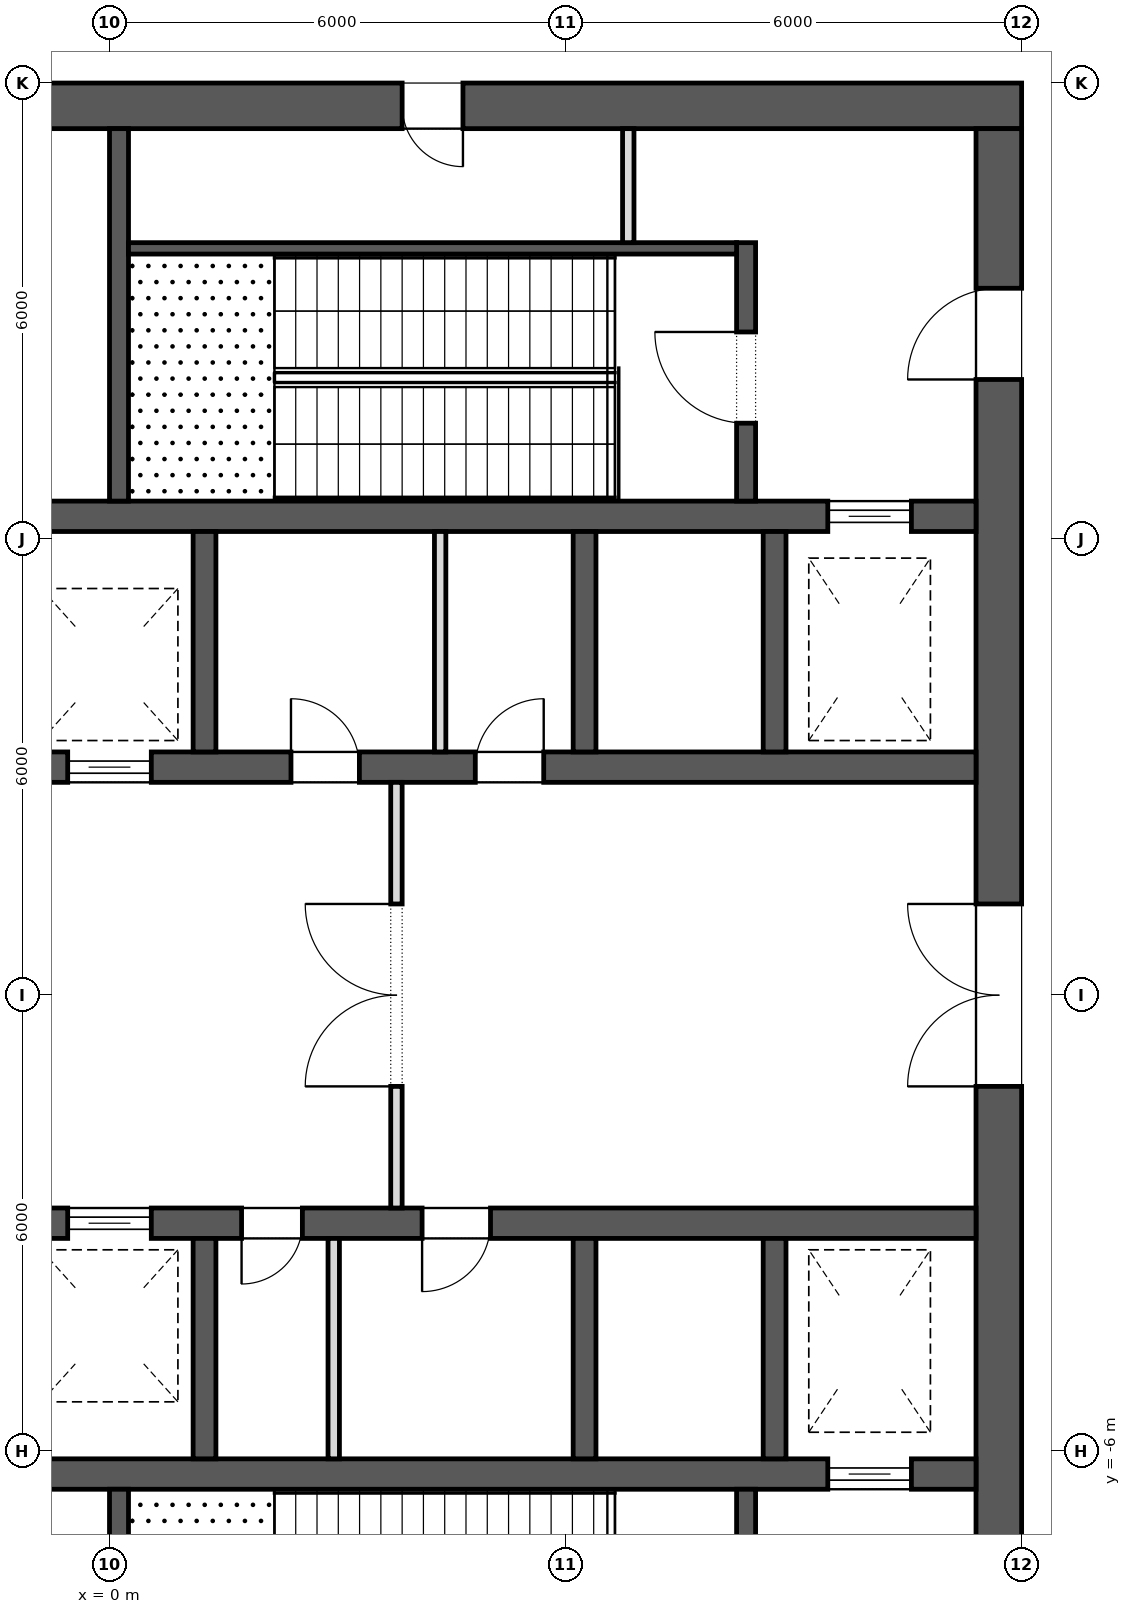
"""IFC4 building model, lengths in metres.
Left out: names, types, materials, properties, quantities, classifications, styles, units other than length and angle.
Written with IfcOpenShell. Run it as: python <this file> out.ifc"""

import sys

from ifc_helpers import new_model, si_unit, direction, frame, frame_2d, origin, place, context, subcontext, project, spatial, rectangle, extrude, element, fill, save


model = new_model("IFC4")
c1 = context("Model", 3, precision=1e-05, world=origin(), true_north=direction((0.0, 1.0)))
c2 = subcontext(c1, "Body", "Model", "MODEL_VIEW")
j1 = project(units=[si_unit("LENGTHUNIT", "METRE"), si_unit("PLANEANGLEUNIT", "RADIAN")], contexts=[c1])
p1 = place(None, origin())
s1 = spatial("IfcSite", under=j1, at=p1, CompositionType="ELEMENT")
p2 = place(p1, origin())
s2 = spatial("IfcBuilding", under=s1, at=p2, CompositionType="ELEMENT")
p3 = place(p2, frame((0.0, 0.0, 343.3)))
s3 = spatial("IfcBuildingStorey", under=s2, at=p3, CompositionType="ELEMENT", Elevation=343.3)
p4 = place(p3, frame((-12.0, 11.7, 0.0), z_axis=(0.0, 0.0, 1.0), x_axis=(1.0, 0.0, 0.0)))
e1 = element("IfcWall", 1, at=p4, inside=s3, PredefinedType="SHEAR", context=c2, shape_type="SweptSolid", body=[
    extrude(rectangle(XDim=24.0, YDim=0.6, at=frame_2d((12.0, 0.0))), origin(), (0.0, 0.0, 1.0), 6.0),
])
p5 = place(p4, frame((9.975, 0.0, 0.0)))
e2 = element("IfcOpeningElement", 2, at=p5, cuts=e1, PredefinedType="OPENING", context=c2, shape_type="SweptSolid", body=[
    extrude(rectangle(XDim=0.9, YDim=2.1, at=frame_2d((0.45, 1.05))), frame((0.0, 0.312, 0.0), z_axis=(0.0, -1.0, 0.0), x_axis=(1.0, 0.0, 0.0)), (0.0, 0.0, 1.0), 0.624),
])
p6 = place(p4, frame((3.6, 0.0, 0.0)))
e3 = element("IfcOpeningElement", 3, at=p6, cuts=e1, PredefinedType="OPENING", context=c2, shape_type="SweptSolid", body=[
    extrude(rectangle(XDim=0.8, YDim=2.1, at=frame_2d((0.4, 1.05))), frame((0.0, 0.312, 0.0), z_axis=(0.0, -1.0, 0.0), x_axis=(1.0, 0.0, 0.0)), (0.0, 0.0, 1.0), 0.624),
])
p7 = place(p4, frame((6.2, 0.0, 0.0)))
e4 = element("IfcOpeningElement", 4, at=p7, cuts=e1, PredefinedType="OPENING", context=c2, shape_type="SweptSolid", body=[
    extrude(rectangle(XDim=0.8, YDim=2.1, at=frame_2d((0.4, 1.05))), frame((0.0, 0.312, 0.0), z_axis=(0.0, -1.0, 0.0), x_axis=(1.0, 0.0, 0.0)), (0.0, 0.0, 1.0), 0.624),
])
p8 = place(p4, frame((15.85, 0.0, 0.0)))
e5 = element("IfcOpeningElement", 5, at=p8, cuts=e1, PredefinedType="OPENING", context=c2, shape_type="SweptSolid", body=[
    extrude(rectangle(XDim=0.8, YDim=2.1, at=frame_2d((0.4, 1.05))), frame((0.0, 0.312, 0.0), z_axis=(0.0, -1.0, 0.0), x_axis=(1.0, 0.0, 0.0)), (0.0, 0.0, 1.0), 0.624),
])
p9 = place(p3, frame((11.7, -11.4, 0.0), z_axis=(0.0, 0.0, 1.0), x_axis=(0.0, 1.0, 0.0)))
e6 = element("IfcWall", 6, at=p9, inside=s3, PredefinedType="SHEAR", context=c2, shape_type="SweptSolid", body=[
    extrude(rectangle(XDim=22.8, YDim=0.6, at=frame_2d((11.4, 0.0))), origin(), (0.0, 0.0, 1.0), 6.0),
])
p10 = place(p9, frame((10.2, 0.0, 0.0)))
e7 = element("IfcOpeningElement", 7, at=p10, cuts=e6, PredefinedType="OPENING", context=c2, shape_type="SweptSolid", body=[
    extrude(rectangle(XDim=2.4, YDim=2.1, at=frame_2d((1.2, 1.05))), frame((0.0, 0.312, 0.0), z_axis=(0.0, -1.0, 0.0), x_axis=(1.0, 0.0, 0.0)), (0.0, 0.0, 1.0), 0.624),
])
p11 = place(p9, frame((19.5, 0.0, 0.0)))
e8 = element("IfcOpeningElement", 8, at=p11, cuts=e6, PredefinedType="OPENING", context=c2, shape_type="SweptSolid", body=[
    extrude(rectangle(XDim=1.2, YDim=2.1, at=frame_2d((0.6, 1.05))), frame((0.0, 0.312, 0.0), z_axis=(0.0, -1.0, 0.0), x_axis=(1.0, 0.0, 0.0)), (0.0, 0.0, 1.0), 0.624),
])
p12 = place(p9, frame((2.1, 0.0, 0.0)))
e9 = element("IfcOpeningElement", 9, at=p12, cuts=e6, PredefinedType="OPENING", context=c2, shape_type="SweptSolid", body=[
    extrude(rectangle(XDim=1.2, YDim=2.1, at=frame_2d((0.6, 1.05))), frame((0.0, 0.312, 0.0), z_axis=(0.0, -1.0, 0.0), x_axis=(1.0, 0.0, 0.0)), (0.0, 0.0, 1.0), 0.624),
])
p13 = place(p3, frame((-11.4, 3.0, 0.0), z_axis=(0.0, 0.0, 1.0), x_axis=(1.0, 0.0, 0.0)))
e10 = element("IfcWall", 10, at=p13, inside=s3, PredefinedType="SHEAR", context=c2, shape_type="SweptSolid", body=[
    extrude(rectangle(XDim=22.8, YDim=0.4, at=frame_2d((11.4, 0.0))), origin(), (0.0, 0.0, 1.0), 6.0),
])
p14 = place(p13, frame((10.85, 0.0, 0.0)))
e11 = element("IfcOpeningElement", 11, at=p14, cuts=e10, PredefinedType="OPENING", context=c2, shape_type="SweptSolid", body=[
    extrude(rectangle(XDim=1.1, YDim=2.1, at=frame_2d((0.55, 1.05))), frame((0.0, 0.212, 0.0), z_axis=(0.0, -1.0, 0.0), x_axis=(1.0, 0.0, 0.0)), (0.0, 0.0, 1.0), 0.424),
])
p15 = place(p13, frame((13.788, 0.0, 0.0)))
e12 = element("IfcOpeningElement", 12, at=p15, cuts=e10, PredefinedType="OPENING", context=c2, shape_type="SweptSolid", body=[
    extrude(rectangle(XDim=0.9, YDim=2.1, at=frame_2d((0.45, 1.05))), frame((0.0, 0.212, 0.0), z_axis=(0.0, -1.0, 0.0), x_axis=(1.0, 0.0, 0.0)), (0.0, 0.0, 1.0), 0.424),
])
p16 = place(p13, frame((16.212, 0.0, 0.0)))
e13 = element("IfcOpeningElement", 13, at=p16, cuts=e10, PredefinedType="OPENING", context=c2, shape_type="SweptSolid", body=[
    extrude(rectangle(XDim=0.9, YDim=2.1, at=frame_2d((0.45, 1.05))), frame((0.0, 0.212, 0.0), z_axis=(0.0, -1.0, 0.0), x_axis=(1.0, 0.0, 0.0)), (0.0, 0.0, 1.0), 0.424),
])
p17 = place(p13, frame((5.95, 0.0, 0.0)))
e14 = element("IfcOpeningElement", 14, at=p17, cuts=e10, PredefinedType="OPENING", context=c2, shape_type="SweptSolid", body=[
    extrude(rectangle(XDim=0.9, YDim=2.1, at=frame_2d((0.45, 1.05))), frame((0.0, 0.212, 0.0), z_axis=(0.0, -1.0, 0.0), x_axis=(1.0, 0.0, 0.0)), (0.0, 0.0, 1.0), 0.424),
])
p18 = place(p13, frame((0.637, 0.0, 0.0)))
e15 = element("IfcOpeningElement", 15, at=p18, cuts=e10, PredefinedType="OPENING", context=c2, shape_type="SweptSolid", body=[
    extrude(rectangle(XDim=0.9, YDim=2.1, at=frame_2d((0.45, 1.05))), frame((0.0, 0.212, 0.0), z_axis=(0.0, -1.0, 0.0), x_axis=(1.0, 0.0, 0.0)), (0.0, 0.0, 1.0), 0.424),
])
p19 = place(p13, frame((3.212, 0.0, 0.0)))
e16 = element("IfcOpeningElement", 16, at=p19, cuts=e10, PredefinedType="OPENING", context=c2, shape_type="SweptSolid", body=[
    extrude(rectangle(XDim=0.9, YDim=2.1, at=frame_2d((0.45, 1.05))), frame((0.0, 0.212, 0.0), z_axis=(0.0, -1.0, 0.0), x_axis=(1.0, 0.0, 0.0)), (0.0, 0.0, 1.0), 0.424),
])
p20 = place(p3, frame((-11.4, 6.3, 0.0), z_axis=(0.0, 0.0, 1.0), x_axis=(1.0, 0.0, 0.0)))
e17 = element("IfcWall", 17, at=p20, inside=s3, PredefinedType="SHEAR", context=c2, shape_type="SweptSolid", body=[
    extrude(rectangle(XDim=22.8, YDim=0.4, at=frame_2d((11.4, 0.0))), origin(), (0.0, 0.0, 1.0), 6.0),
])
p21 = place(p20, frame((20.85, 0.0, 0.0)))
e18 = element("IfcOpeningElement", 18, at=p21, cuts=e17, PredefinedType="OPENING", context=c2, shape_type="SweptSolid", body=[
    extrude(rectangle(XDim=1.1, YDim=2.1, at=frame_2d((0.55, 1.05))), frame((0.0, 0.212, 0.0), z_axis=(0.0, -1.0, 0.0), x_axis=(1.0, 0.0, 0.0)), (0.0, 0.0, 1.0), 0.424),
])
for number, where, z_axis, x_axis in (
    (19, (1.25, 3.2, 0.0), (0.0, 0.0, 1.0), (0.0, 1.0, 0.0)),
    (20, (6.25, 3.2, 0.0), (0.0, 0.0, 1.0), (0.0, 1.0, 0.0)),
    (21, (8.75, 3.2, 0.0), (0.0, 0.0, 1.0), (0.0, 1.0, 0.0)),
):
    element("IfcWall", number, at=place(p3, frame(where, z_axis=z_axis, x_axis=x_axis)), inside=s3, PredefinedType="SHEAR", context=c2, shape_type="SweptSolid", body=[
        extrude(rectangle(XDim=2.9, YDim=0.3, at=frame_2d((1.45, 0.0))), origin(), (0.0, 0.0, 1.0), 6.0),
    ])
p22 = place(p3, frame((-11.4, -3.0, 0.0), z_axis=(0.0, 0.0, 1.0), x_axis=(1.0, 0.0, 0.0)))
e22 = element("IfcWall", 22, at=p22, inside=s3, PredefinedType="SHEAR", context=c2, shape_type="SweptSolid", body=[
    extrude(rectangle(XDim=22.8, YDim=0.4, at=frame_2d((11.4, 0.0))), origin(), (0.0, 0.0, 1.0), 6.0),
])
p23 = place(p22, frame((10.85, 0.0, 0.0)))
e23 = element("IfcOpeningElement", 23, at=p23, cuts=e22, PredefinedType="OPENING", context=c2, shape_type="SweptSolid", body=[
    extrude(rectangle(XDim=1.1, YDim=2.1, at=frame_2d((0.55, 1.05))), frame((0.0, 0.212, 0.0), z_axis=(0.0, -1.0, 0.0), x_axis=(1.0, 0.0, 0.0)), (0.0, 0.0, 1.0), 0.424),
])
p24 = place(p22, frame((13.137, 0.0, 0.0)))
e24 = element("IfcOpeningElement", 24, at=p24, cuts=e22, PredefinedType="OPENING", context=c2, shape_type="SweptSolid", body=[
    extrude(rectangle(XDim=0.8, YDim=2.1, at=frame_2d((0.4, 1.05))), frame((0.0, 0.212, 0.0), z_axis=(0.0, -1.0, 0.0), x_axis=(1.0, 0.0, 0.0)), (0.0, 0.0, 1.0), 0.424),
])
p25 = place(p22, frame((15.512, 0.0, 0.0)))
e25 = element("IfcOpeningElement", 25, at=p25, cuts=e22, PredefinedType="OPENING", context=c2, shape_type="SweptSolid", body=[
    extrude(rectangle(XDim=0.9, YDim=2.1, at=frame_2d((0.45, 1.05))), frame((0.0, 0.212, 0.0), z_axis=(0.0, -1.0, 0.0), x_axis=(1.0, 0.0, 0.0)), (0.0, 0.0, 1.0), 0.424),
])
p26 = place(p22, frame((5.95, 0.0, 0.0)))
e26 = element("IfcOpeningElement", 26, at=p26, cuts=e22, PredefinedType="OPENING", context=c2, shape_type="SweptSolid", body=[
    extrude(rectangle(XDim=0.9, YDim=2.1, at=frame_2d((0.45, 1.05))), frame((0.0, 0.212, 0.0), z_axis=(0.0, -1.0, 0.0), x_axis=(1.0, 0.0, 0.0)), (0.0, 0.0, 1.0), 0.424),
])
p27 = place(p22, frame((1.212, 0.0, 0.0)))
e27 = element("IfcOpeningElement", 27, at=p27, cuts=e22, PredefinedType="OPENING", context=c2, shape_type="SweptSolid", body=[
    extrude(rectangle(XDim=0.9, YDim=2.1, at=frame_2d((0.45, 1.05))), frame((0.0, 0.212, 0.0), z_axis=(0.0, -1.0, 0.0), x_axis=(1.0, 0.0, 0.0)), (0.0, 0.0, 1.0), 0.424),
])
p28 = place(p22, frame((3.788, 0.0, 0.0)))
e28 = element("IfcOpeningElement", 28, at=p28, cuts=e22, PredefinedType="OPENING", context=c2, shape_type="SweptSolid", body=[
    extrude(rectangle(XDim=0.9, YDim=2.1, at=frame_2d((0.45, 1.05))), frame((0.0, 0.212, 0.0), z_axis=(0.0, -1.0, 0.0), x_axis=(1.0, 0.0, 0.0)), (0.0, 0.0, 1.0), 0.424),
])
p29 = place(p3, frame((-11.4, -6.3, 0.0), z_axis=(0.0, 0.0, 1.0), x_axis=(1.0, 0.0, 0.0)))
e29 = element("IfcWall", 29, at=p29, inside=s3, PredefinedType="SHEAR", context=c2, shape_type="SweptSolid", body=[
    extrude(rectangle(XDim=22.8, YDim=0.4, at=frame_2d((11.4, 0.0))), origin(), (0.0, 0.0, 1.0), 6.0),
])
p30 = place(p29, frame((20.85, 0.0, 0.0)))
e30 = element("IfcOpeningElement", 30, at=p30, cuts=e29, PredefinedType="OPENING", context=c2, shape_type="SweptSolid", body=[
    extrude(rectangle(XDim=1.1, YDim=2.1, at=frame_2d((0.55, 1.05))), frame((0.0, 0.212, 0.0), z_axis=(0.0, -1.0, 0.0), x_axis=(1.0, 0.0, 0.0)), (0.0, 0.0, 1.0), 0.424),
])
for number, where, z_axis, x_axis in (
    (31, (1.25, -6.1, 0.0), (0.0, 0.0, 1.0), (0.0, 1.0, 0.0)),
    (32, (6.25, -6.1, 0.0), (0.0, 0.0, 1.0), (0.0, 1.0, 0.0)),
    (33, (8.75, -6.1, 0.0), (0.0, 0.0, 1.0), (0.0, 1.0, 0.0)),
):
    element("IfcWall", number, at=place(p3, frame(where, z_axis=z_axis, x_axis=x_axis)), inside=s3, PredefinedType="SHEAR", context=c2, shape_type="SweptSolid", body=[
        extrude(rectangle(XDim=2.9, YDim=0.3, at=frame_2d((1.45, 0.0))), origin(), (0.0, 0.0, 1.0), 6.0),
    ])
p31 = place(p3, frame((0.125, 6.5, 0.0), z_axis=(0.0, 0.0, 1.0), x_axis=(0.0, 1.0, 0.0)))
e34 = element("IfcWall", 34, at=p31, inside=s3, PredefinedType="SHEAR", context=c2, shape_type="SweptSolid", body=[
    extrude(rectangle(XDim=4.9, YDim=0.25, at=frame_2d((2.45, 0.0))), origin(), (0.0, 0.0, 1.0), 5.65),
])
p32 = place(p3, frame((8.375, 6.5, 0.0), z_axis=(0.0, 0.0, 1.0), x_axis=(0.0, 1.0, 0.0)))
e35 = element("IfcWall", 35, at=p32, inside=s3, PredefinedType="SHEAR", context=c2, shape_type="SweptSolid", body=[
    extrude(rectangle(XDim=3.4, YDim=0.25, at=frame_2d((1.7, 0.0))), origin(), (0.0, 0.0, 1.0), 5.65),
])
p33 = place(p32, frame((1.025, 0.0, 0.0)))
e36 = element("IfcOpeningElement", 36, at=p33, cuts=e35, PredefinedType="OPENING", context=c2, shape_type="SweptSolid", body=[
    extrude(rectangle(XDim=1.2, YDim=2.1, at=frame_2d((0.6, 1.05))), frame((0.0, 0.137, 0.0), z_axis=(0.0, -1.0, 0.0), x_axis=(1.0, 0.0, 0.0)), (0.0, 0.0, 1.0), 0.274),
])
p34 = place(p3, frame((0.25, 9.825, 0.0), z_axis=(0.0, 0.0, 1.0), x_axis=(1.0, 0.0, 0.0)))
e37 = element("IfcWall", 37, at=p34, inside=s3, PredefinedType="SHEAR", context=c2, shape_type="SweptSolid", body=[
    extrude(rectangle(XDim=8.0, YDim=0.15, at=frame_2d((4.0, 0.0))), origin(), (0.0, 0.0, 1.0), 5.65),
])
p35 = place(p3, frame((6.825, 9.9, 0.0), z_axis=(0.0, 0.0, 1.0), x_axis=(0.0, 1.0, 0.0)))
e38 = element("IfcWall", 38, at=p35, inside=s3, PredefinedType="PARTITIONING", context=c2, shape_type="SweptSolid", body=[
    extrude(rectangle(XDim=1.5, YDim=0.15, at=frame_2d((0.75, 0.0))), origin(), (0.0, 0.0, 1.0), 5.65),
])
p36 = place(p3, frame((0.125, -11.4, 0.0), z_axis=(0.0, 0.0, 1.0), x_axis=(0.0, 1.0, 0.0)))
e39 = element("IfcWall", 39, at=p36, inside=s3, PredefinedType="SHEAR", context=c2, shape_type="SweptSolid", body=[
    extrude(rectangle(XDim=4.9, YDim=0.25, at=frame_2d((2.45, 0.0))), origin(), (0.0, 0.0, 1.0), 5.65),
])
p37 = place(p3, frame((8.375, -9.9, 0.0), z_axis=(0.0, 0.0, 1.0), x_axis=(0.0, 1.0, 0.0)))
e40 = element("IfcWall", 40, at=p37, inside=s3, PredefinedType="SHEAR", context=c2, shape_type="SweptSolid", body=[
    extrude(rectangle(XDim=3.4, YDim=0.25, at=frame_2d((1.7, 0.0))), origin(), (0.0, 0.0, 1.0), 5.65),
])
p38 = place(p37, frame((1.175, 0.0, 0.0)))
e41 = element("IfcOpeningElement", 41, at=p38, cuts=e40, PredefinedType="OPENING", context=c2, shape_type="SweptSolid", body=[
    extrude(rectangle(XDim=1.2, YDim=2.1, at=frame_2d((0.6, 1.05))), frame((0.0, 0.137, 0.0), z_axis=(0.0, -1.0, 0.0), x_axis=(1.0, 0.0, 0.0)), (0.0, 0.0, 1.0), 0.274),
])
for number, where, z_axis, x_axis in (
    (42, (4.35, 3.2, 0.0), (0.0, 0.0, 1.0), (0.0, 1.0, 0.0)),
    (43, (2.95, -6.1, 0.0), (0.0, 0.0, 1.0), (0.0, 1.0, 0.0)),
):
    element("IfcWall", number, at=place(p3, frame(where, z_axis=z_axis, x_axis=x_axis)), inside=s3, PredefinedType="PARTITIONING", context=c2, shape_type="SweptSolid", body=[
        extrude(rectangle(XDim=2.9, YDim=0.15, at=frame_2d((1.45, 0.0))), origin(), (0.0, 0.0, 1.0), 5.65),
    ])
p39 = place(p3, frame((3.775, -2.8, 0.0), z_axis=(0.0, 0.0, 1.0), x_axis=(0.0, 1.0, 0.0)))
e44 = element("IfcWall", 44, at=p39, inside=s3, PredefinedType="PARTITIONING", context=c2, shape_type="SweptSolid", body=[
    extrude(rectangle(XDim=5.6, YDim=0.15, at=frame_2d((2.8, 0.0))), origin(), (0.0, 0.0, 1.0), 5.65),
])
p40 = place(p39, frame((1.6, 0.0, 0.0)))
e45 = element("IfcOpeningElement", 45, at=p40, cuts=e44, PredefinedType="OPENING", context=c2, shape_type="SweptSolid", body=[
    extrude(rectangle(XDim=2.4, YDim=2.1, at=frame_2d((1.2, 1.05))), frame((0.0, 0.087, 0.0), z_axis=(0.0, -1.0, 0.0), x_axis=(1.0, 0.0, 0.0)), (0.0, 0.0, 1.0), 0.174),
])
p41 = place(p21, origin())
e46 = element("IfcDoor", 46, at=p41, inside=s3, OperationType="SLIDING_TO_LEFT", PredefinedType="DOOR", context=c2, shape_type="SweptSolid", body=[
    extrude(rectangle(XDim=1.1, YDim=2.1, at=frame_2d((0.55, 1.05))), frame((0.0, 0.025, 0.0), z_axis=(0.0, -1.0, 0.0), x_axis=(1.0, 0.0, 0.0)), (0.0, 0.0, 1.0), 0.05),
])
fill(e18, e46)
p42 = place(p30, origin())
e47 = element("IfcDoor", 47, at=p42, inside=s3, OperationType="SLIDING_TO_LEFT", PredefinedType="DOOR", context=c2, shape_type="SweptSolid", body=[
    extrude(rectangle(XDim=1.1, YDim=2.1, at=frame_2d((0.55, 1.05))), frame((0.0, 0.025, 0.0), z_axis=(0.0, -1.0, 0.0), x_axis=(1.0, 0.0, 0.0)), (0.0, 0.0, 1.0), 0.05),
])
fill(e30, e47)
p43 = place(p14, origin())
e48 = element("IfcDoor", 48, at=p43, inside=s3, OperationType="SLIDING_TO_LEFT", PredefinedType="DOOR", context=c2, shape_type="SweptSolid", body=[
    extrude(rectangle(XDim=1.1, YDim=2.1, at=frame_2d((0.55, 1.05))), frame((0.0, 0.025, 0.0), z_axis=(0.0, -1.0, 0.0), x_axis=(1.0, 0.0, 0.0)), (0.0, 0.0, 1.0), 0.05),
])
fill(e11, e48)
p44 = place(p23, origin())
e49 = element("IfcDoor", 49, at=p44, inside=s3, OperationType="SLIDING_TO_LEFT", PredefinedType="DOOR", context=c2, shape_type="SweptSolid", body=[
    extrude(rectangle(XDim=1.1, YDim=2.1, at=frame_2d((0.55, 1.05))), frame((0.0, 0.025, 0.0), z_axis=(0.0, -1.0, 0.0), x_axis=(1.0, 0.0, 0.0)), (0.0, 0.0, 1.0), 0.05),
])
fill(e23, e49)
p45 = place(p10, origin())
e50 = element("IfcDoor", 50, at=p45, inside=s3, OperationType="DOUBLE_DOOR_SINGLE_SWING", PredefinedType="DOOR", context=c2, shape_type="SweptSolid", body=[
    extrude(rectangle(XDim=2.4, YDim=2.1, at=frame_2d((1.2, 1.05))), frame((0.0, 0.025, 0.0), z_axis=(0.0, -1.0, 0.0), x_axis=(1.0, 0.0, 0.0)), (0.0, 0.0, 1.0), 0.05),
])
fill(e7, e50)
p46 = place(p40, origin())
e51 = element("IfcDoor", 51, at=p46, inside=s3, OperationType="DOUBLE_DOOR_SINGLE_SWING", PredefinedType="DOOR", context=c2, shape_type="SweptSolid", body=[
    extrude(rectangle(XDim=2.4, YDim=2.1, at=frame_2d((1.2, 1.05))), frame((0.0, 0.025, 0.0), z_axis=(0.0, -1.0, 0.0), x_axis=(1.0, 0.0, 0.0)), (0.0, 0.0, 1.0), 0.05),
])
fill(e45, e51)
p47 = place(p33, origin())
e52 = element("IfcDoor", 52, at=p47, inside=s3, OperationType="SINGLE_SWING_LEFT", PredefinedType="DOOR", context=c2, shape_type="SweptSolid", body=[
    extrude(rectangle(XDim=1.2, YDim=2.1, at=frame_2d((0.6, 1.05))), frame((0.0, 0.025, 0.0), z_axis=(0.0, -1.0, 0.0), x_axis=(1.0, 0.0, 0.0)), (0.0, 0.0, 1.0), 0.05),
])
fill(e36, e52)
p48 = place(p11, origin())
e53 = element("IfcDoor", 53, at=p48, inside=s3, OperationType="SINGLE_SWING_RIGHT", PredefinedType="DOOR", context=c2, shape_type="SweptSolid", body=[
    extrude(rectangle(XDim=1.2, YDim=2.1, at=frame_2d((0.6, 1.05))), frame((0.0, 0.025, 0.0), z_axis=(0.0, -1.0, 0.0), x_axis=(1.0, 0.0, 0.0)), (0.0, 0.0, 1.0), 0.05),
])
fill(e8, e53)
p49 = place(p8, frame((0.8, 0.0, 0.0), z_axis=(0.0, 0.0, 1.0), x_axis=(-1.0, 0.0, 0.0)))
e54 = element("IfcDoor", 54, at=p49, inside=s3, OperationType="SINGLE_SWING_RIGHT", PredefinedType="DOOR", context=c2, shape_type="SweptSolid", body=[
    extrude(rectangle(XDim=0.8, YDim=2.1, at=frame_2d((0.4, 1.05))), frame((0.0, 0.025, 0.0), z_axis=(0.0, -1.0, 0.0), x_axis=(1.0, 0.0, 0.0)), (0.0, 0.0, 1.0), 0.05),
])
fill(e5, e54)
p50 = place(p15, origin())
e55 = element("IfcDoor", 55, at=p50, inside=s3, OperationType="SINGLE_SWING_RIGHT", PredefinedType="DOOR", context=c2, shape_type="SweptSolid", body=[
    extrude(rectangle(XDim=0.9, YDim=2.1, at=frame_2d((0.45, 1.05))), frame((0.0, 0.025, 0.0), z_axis=(0.0, -1.0, 0.0), x_axis=(1.0, 0.0, 0.0)), (0.0, 0.0, 1.0), 0.05),
])
fill(e12, e55)
p51 = place(p16, origin())
e56 = element("IfcDoor", 56, at=p51, inside=s3, OperationType="SINGLE_SWING_LEFT", PredefinedType="DOOR", context=c2, shape_type="SweptSolid", body=[
    extrude(rectangle(XDim=0.9, YDim=2.1, at=frame_2d((0.45, 1.05))), frame((0.0, 0.025, 0.0), z_axis=(0.0, -1.0, 0.0), x_axis=(1.0, 0.0, 0.0)), (0.0, 0.0, 1.0), 0.05),
])
fill(e13, e56)
p52 = place(p24, frame((0.8, 0.0, 0.0), z_axis=(0.0, 0.0, 1.0), x_axis=(-1.0, 0.0, 0.0)))
e57 = element("IfcDoor", 57, at=p52, inside=s3, OperationType="SINGLE_SWING_LEFT", PredefinedType="DOOR", context=c2, shape_type="SweptSolid", body=[
    extrude(rectangle(XDim=0.8, YDim=2.1, at=frame_2d((0.4, 1.05))), frame((0.0, 0.025, 0.0), z_axis=(0.0, -1.0, 0.0), x_axis=(1.0, 0.0, 0.0)), (0.0, 0.0, 1.0), 0.05),
])
fill(e24, e57)
p53 = place(p25, frame((0.9, 0.0, 0.0), z_axis=(0.0, 0.0, 1.0), x_axis=(-1.0, 0.0, 0.0)))
e58 = element("IfcDoor", 58, at=p53, inside=s3, OperationType="SINGLE_SWING_LEFT", PredefinedType="DOOR", context=c2, shape_type="SweptSolid", body=[
    extrude(rectangle(XDim=0.9, YDim=2.1, at=frame_2d((0.45, 1.05))), frame((0.0, 0.025, 0.0), z_axis=(0.0, -1.0, 0.0), x_axis=(1.0, 0.0, 0.0)), (0.0, 0.0, 1.0), 0.05),
])
fill(e25, e58)
save(model, sys.argv[1])
